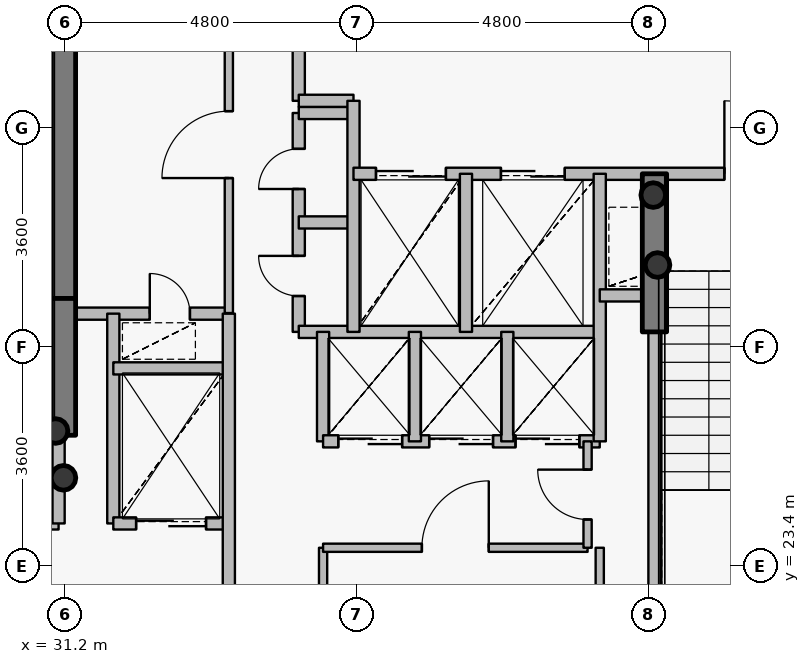
"""IFC4 building model, lengths in metres.
Left out: names, types, materials, properties, quantities, classifications, styles, units other than length and angle.
Written with IfcOpenShell. Run it as: python <this file> out.ifc"""

import sys

from ifc_helpers import new_model, si_unit, direction, frame, frame_2d, origin, origin_2d, place, context, subcontext, project, spatial, rectangle, hollow_circle, extrude, source, transform, mapped, element, fill, save


model = new_model("IFC4")
c1 = context("Model", 3, precision=1e-05, world=origin(), true_north=direction((0.0, 1.0)))
c2 = subcontext(c1, "Body", "Model", "MODEL_VIEW")
j1 = project(units=[si_unit("LENGTHUNIT", "METRE"), si_unit("PLANEANGLEUNIT", "RADIAN")], contexts=[c1])
p1 = place(None, origin())
s1 = spatial("IfcSite", under=j1, at=p1, CompositionType="ELEMENT")
p2 = place(p1, origin())
s2 = spatial("IfcBuilding", under=s1, at=p2, CompositionType="ELEMENT")
p3 = place(p2, frame((0.0, 0.0, 276.75)))
s3 = spatial("IfcBuildingStorey", under=s2, at=p3, CompositionType="ELEMENT", Elevation=276.75)
p4 = place(p3, frame((31.18, 27.8, 0.0), z_axis=(0.0, 0.0, 1.0), x_axis=(0.0, 1.0, 0.0)))
e1 = element("IfcWall", 1, at=p4, inside=s3, PredefinedType="SHEAR", context=c2, shape_type="SweptSolid", body=[
    extrude(rectangle(XDim=4.75, YDim=0.4, at=frame_2d((2.375, 0.0))), origin(), (0.0, 0.0, 1.0), 3.75),
])
for number, where, z_axis, x_axis in (
    (2, (31.05, 25.62, 0.0), (0.0, 0.0, 1.0), (1.0, 0.0, 0.0)),
    (3, (31.18, 24.85, 0.0), (0.0, 0.0, 1.0), (1.0, 0.0, 0.0)),
    (4, (40.95, 28.35, 0.0), (0.0, 0.0, 1.0), (1.0, 0.0, 0.0)),
    (5, (40.88, 29.5, 0.0), (0.0, 0.0, 1.0), (1.0, 0.0, 0.0)),
):
    element("IfcColumn", number, at=place(p3, frame(where, z_axis=z_axis, x_axis=x_axis)), inside=s3, PredefinedType="COLUMN", context=c2, shape_type="SweptSolid", body=[
        extrude(hollow_circle(Radius=0.203, WallThickness=0.016, at=origin_2d()), origin(), (0.0, 0.0, 1.0), 3.75),
    ])
p5 = place(p3, frame((31.18, 25.55, 0.0), z_axis=(0.0, 0.0, 1.0), x_axis=(0.0, 1.0, 0.0)))
e6 = element("IfcWall", 6, at=p5, inside=s3, PredefinedType="SHEAR", context=c2, shape_type="SweptSolid", body=[
    extrude(rectangle(XDim=2.25, YDim=0.4, at=frame_2d((1.125, 0.0))), origin(), (0.0, 0.0, 1.0), 3.1),
])
p6 = place(p3, frame((40.9, 27.25, 0.0), z_axis=(0.0, 0.0, 1.0), x_axis=(0.0, 1.0, 0.0)))
e7 = element("IfcWall", 7, at=p6, inside=s3, PredefinedType="SHEAR", context=c2, shape_type="SweptSolid", body=[
    extrude(rectangle(XDim=2.6, YDim=0.4, at=frame_2d((1.3, 0.0))), origin(), (0.0, 0.0, 1.0), 3.1),
])
p7 = place(p3, frame((27.56, 24.1, 0.0), z_axis=(0.0, 0.0, 1.0), x_axis=(1.0, 0.0, 0.0)))
e8 = element("IfcWall", 8, at=p7, inside=s3, PredefinedType="PARTITIONING", context=c2, shape_type="SweptSolid", body=[
    extrude(rectangle(XDim=3.54, YDim=0.2, at=frame_2d((1.77, 0.0))), origin(), (0.0, 0.0, 1.0), 3.5),
])
p8 = place(p7, frame((1.17, 0.0, 0.0)))
e9 = element("IfcOpeningElement", 9, at=p8, cuts=e8, PredefinedType="OPENING", context=c2, shape_type="SweptSolid", body=[
    extrude(rectangle(XDim=1.2, YDim=2.15, at=origin_2d()), frame((0.6, 0.11, 1.075), z_axis=(0.0, -1.0, 0.0), x_axis=(1.0, 0.0, 0.0)), (0.0, 0.0, 1.0), 0.22),
])
p9 = place(p3, frame((31.1, 24.1, 0.0), z_axis=(0.0, 0.0, 1.0), x_axis=(0.0, 1.0, 0.0)))
e10 = element("IfcWall", 10, at=p9, inside=s3, PredefinedType="PARTITIONING", context=c2, shape_type="SweptSolid", body=[
    extrude(rectangle(XDim=1.44, YDim=0.2, at=frame_2d((0.72, 0.0))), origin(), (0.0, 0.0, 1.0), 3.5),
])
p10 = place(p3, frame((31.1, 27.55, 0.0), z_axis=(0.0, 0.0, 1.0), x_axis=(1.0, 0.0, 0.0)))
e11 = element("IfcWall", 11, at=p10, inside=s3, PredefinedType="PARTITIONING", context=c2, shape_type="SweptSolid", body=[
    extrude(rectangle(XDim=2.8, YDim=0.2, at=frame_2d((1.4, 0.0))), origin(), (0.0, 0.0, 1.0), 3.085),
])
p11 = place(p10, frame((1.5, 0.0, 0.0)))
e12 = element("IfcOpeningElement", 12, at=p11, cuts=e11, PredefinedType="OPENING", context=c2, shape_type="SweptSolid", body=[
    extrude(rectangle(XDim=0.66, YDim=2.05, at=origin_2d()), frame((0.33, 0.11, 1.025), z_axis=(0.0, -1.0, 0.0), x_axis=(1.0, 0.0, 0.0)), (0.0, 0.0, 1.0), 0.22),
])
p12 = place(p3, frame((32.0, 24.1, 0.0), z_axis=(0.0, 0.0, 1.0), x_axis=(0.0, 1.0, 0.0)))
e13 = element("IfcWall", 13, at=p12, inside=s3, PredefinedType="PARTITIONING", context=c2, shape_type="SweptSolid", body=[
    extrude(rectangle(XDim=3.45, YDim=0.2, at=frame_2d((1.725, 0.0))), origin(), (0.0, 0.0, 1.0), 3.5),
])
p13 = place(p3, frame((32.0, 24.1, 0.0), z_axis=(0.0, 0.0, 1.0), x_axis=(1.0, 0.0, 0.0)))
e14 = element("IfcWall", 14, at=p13, inside=s3, PredefinedType="PARTITIONING", context=c2, shape_type="SweptSolid", body=[
    extrude(rectangle(XDim=1.9, YDim=0.2, at=frame_2d((0.95, 0.0))), origin(), (0.0, 0.0, 1.0), 3.085),
])
p14 = place(p13, frame((0.375, 0.0, 0.0)))
e15 = element("IfcOpeningElement", 15, at=p14, cuts=e14, PredefinedType="OPENING", context=c2, shape_type="SweptSolid", body=[
    extrude(rectangle(XDim=1.15, YDim=2.15, at=origin_2d()), frame((0.575, 0.11, 1.075), z_axis=(0.0, -1.0, 0.0), x_axis=(1.0, 0.0, 0.0)), (0.0, 0.0, 1.0), 0.22),
])
p15 = place(p3, frame((32.0, 26.65, 0.0), z_axis=(0.0, 0.0, 1.0), x_axis=(1.0, 0.0, 0.0)))
e16 = element("IfcWall", 16, at=p15, inside=s3, PredefinedType="PARTITIONING", context=c2, shape_type="SweptSolid", body=[
    extrude(rectangle(XDim=1.9, YDim=0.2, at=frame_2d((0.95, 0.0))), origin(), (0.0, 0.0, 1.0), 3.085),
])
p16 = place(p3, frame((33.9, 20.9, 0.0), z_axis=(0.0, 0.0, 1.0), x_axis=(0.0, 1.0, 0.0)))
e17 = element("IfcWall", 17, at=p16, inside=s3, PredefinedType="PARTITIONING", context=c2, shape_type="SweptSolid", body=[
    extrude(rectangle(XDim=6.65, YDim=0.2, at=frame_2d((3.325, 0.0))), origin(), (0.0, 0.0, 1.0), 3.085),
])
p17 = place(p3, frame((33.9, 27.56, 0.0), z_axis=(0.0, 0.0, 1.0), x_axis=(0.0, 1.0, 0.0)))
e18 = element("IfcWall", 18, at=p17, inside=s3, PredefinedType="PARTITIONING", context=c2, shape_type="SweptSolid", body=[
    extrude(rectangle(XDim=5.54, YDim=0.135, at=frame_2d((2.77, 0.0))), origin(), (0.0, 0.0, 1.0), 3.085),
])
p18 = place(p17, frame((2.22, 0.0, 0.0)))
e19 = element("IfcOpeningElement", 19, at=p18, cuts=e18, PredefinedType="OPENING", context=c2, shape_type="SweptSolid", body=[
    extrude(rectangle(XDim=1.1, YDim=2.15, at=origin_2d()), frame((0.55, 0.078, 1.075), z_axis=(0.0, -1.0, 0.0), x_axis=(1.0, 0.0, 0.0)), (0.0, 0.0, 1.0), 0.155),
])
p19 = place(p3, frame((35.05, 27.25, 0.0), z_axis=(0.0, 0.0, 1.0), x_axis=(0.0, 1.0, 0.0)))
e20 = element("IfcWall", 20, at=p19, inside=s3, PredefinedType="PARTITIONING", context=c2, shape_type="SweptSolid", body=[
    extrude(rectangle(XDim=3.6, YDim=0.2, at=frame_2d((1.8, 0.0))), origin(), (0.0, 0.0, 1.0), 3.5),
])
p20 = place(p19, frame((0.59, 0.0, 0.0)))
e21 = element("IfcOpeningElement", 21, at=p20, cuts=e20, PredefinedType="OPENING", context=c2, shape_type="SweptSolid", body=[
    extrude(rectangle(XDim=0.66, YDim=2.05, at=origin_2d()), frame((0.33, 0.11, 1.025), z_axis=(0.0, -1.0, 0.0), x_axis=(1.0, 0.0, 0.0)), (0.0, 0.0, 1.0), 0.22),
])
p21 = place(p19, frame((2.35, 0.0, 0.0)))
e22 = element("IfcOpeningElement", 22, at=p21, cuts=e20, PredefinedType="OPENING", context=c2, shape_type="SweptSolid", body=[
    extrude(rectangle(XDim=0.66, YDim=2.05, at=origin_2d()), frame((0.33, 0.11, 1.025), z_axis=(0.0, -1.0, 0.0), x_axis=(1.0, 0.0, 0.0)), (0.0, 0.0, 1.0), 0.22),
])
p22 = place(p3, frame((35.05, 27.25, 0.0), z_axis=(0.0, 0.0, 1.0), x_axis=(1.0, 0.0, 0.0)))
e23 = element("IfcWall", 23, at=p22, inside=s3, PredefinedType="PARTITIONING", context=c2, shape_type="SweptSolid", body=[
    extrude(rectangle(XDim=4.95, YDim=0.2, at=frame_2d((2.475, 0.0))), origin(), (0.0, 0.0, 1.0), 3.085),
])
for number, where, z_axis, x_axis in (
    (24, (35.05, 29.05, 0.0), (0.0, 0.0, 1.0), (1.0, 0.0, 0.0)),
    (25, (35.05, 30.85, 0.0), (0.0, 0.0, 1.0), (1.0, 0.0, 0.0)),
):
    element("IfcWall", number, at=place(p3, frame(where, z_axis=z_axis, x_axis=x_axis)), inside=s3, PredefinedType="PARTITIONING", context=c2, shape_type="SweptSolid", body=[
        extrude(rectangle(XDim=0.9, YDim=0.2, at=frame_2d((0.45, 0.0))), origin(), (0.0, 0.0, 1.0), 3.5),
    ])
p23 = place(p3, frame((35.05, 31.05, 0.0), z_axis=(0.0, 0.0, 1.0), x_axis=(0.0, 1.0, 0.0)))
e26 = element("IfcWall", 26, at=p23, inside=s3, PredefinedType="PARTITIONING", context=c2, shape_type="SweptSolid", body=[
    extrude(rectangle(XDim=2.05, YDim=0.2, at=frame_2d((1.025, 0.0))), origin(), (0.0, 0.0, 1.0), 3.085),
])
p24 = place(p3, frame((35.05, 31.05, 0.0), z_axis=(0.0, 0.0, 1.0), x_axis=(1.0, 0.0, 0.0)))
e27 = element("IfcWall", 27, at=p24, inside=s3, PredefinedType="PARTITIONING", context=c2, shape_type="SweptSolid", body=[
    extrude(rectangle(XDim=0.9, YDim=0.2, at=frame_2d((0.45, 0.0))), origin(), (0.0, 0.0, 1.0), 3.5),
])
p25 = place(p3, frame((35.45, 20.9, 0.0), z_axis=(0.0, 0.0, 1.0), x_axis=(0.0, 1.0, 0.0)))
e28 = element("IfcWall", 28, at=p25, inside=s3, PredefinedType="PARTITIONING", context=c2, shape_type="SweptSolid", body=[
    extrude(rectangle(XDim=2.8, YDim=0.135, at=frame_2d((1.4, 0.0))), origin(), (0.0, 0.0, 1.0), 3.085),
])
p26 = place(p3, frame((35.45, 23.7, 0.0), z_axis=(0.0, 0.0, 1.0), x_axis=(1.0, 0.0, 0.0)))
e29 = element("IfcWall", 29, at=p26, inside=s3, PredefinedType="PARTITIONING", context=c2, shape_type="SweptSolid", body=[
    extrude(rectangle(XDim=4.35, YDim=0.135, at=frame_2d((2.175, 0.0))), origin(), (0.0, 0.0, 1.0), 3.085),
])
p27 = place(p26, frame((1.625, 0.0, 0.0)))
e30 = element("IfcOpeningElement", 30, at=p27, cuts=e29, PredefinedType="OPENING", context=c2, shape_type="SweptSolid", body=[
    extrude(rectangle(XDim=1.1, YDim=2.15, at=origin_2d()), frame((0.55, 0.078, 1.075), z_axis=(0.0, -1.0, 0.0), x_axis=(1.0, 0.0, 0.0)), (0.0, 0.0, 1.0), 0.155),
])
p28 = place(p3, frame((35.45, 25.45, 0.0), z_axis=(0.0, 0.0, 1.0), x_axis=(0.0, 1.0, 0.0)))
e31 = element("IfcWall", 31, at=p28, inside=s3, PredefinedType="PARTITIONING", context=c2, shape_type="SweptSolid", body=[
    extrude(rectangle(XDim=1.8, YDim=0.2, at=frame_2d((0.9, 0.0))), origin(), (0.0, 0.0, 1.0), 3.5),
])
p29 = place(p3, frame((35.45, 25.45, 0.0), z_axis=(0.0, 0.0, 1.0), x_axis=(1.0, 0.0, 0.0)))
e32 = element("IfcWall", 32, at=p29, inside=s3, PredefinedType="PARTITIONING", context=c2, shape_type="SweptSolid", body=[
    extrude(rectangle(XDim=4.55, YDim=0.2, at=frame_2d((2.275, 0.0))), origin(), (0.0, 0.0, 1.0), 3.085),
])
p30 = place(p29, frame((0.25, 0.0, 0.0)))
e33 = element("IfcOpeningElement", 33, at=p30, cuts=e32, PredefinedType="OPENING", context=c2, shape_type="SweptSolid", body=[
    extrude(rectangle(XDim=1.05, YDim=2.15, at=origin_2d()), frame((0.525, 0.11, 1.075), z_axis=(0.0, -1.0, 0.0), x_axis=(1.0, 0.0, 0.0)), (0.0, 0.0, 1.0), 0.22),
])
p31 = place(p29, frame((1.745, 0.0, 0.0)))
e34 = element("IfcOpeningElement", 34, at=p31, cuts=e32, PredefinedType="OPENING", context=c2, shape_type="SweptSolid", body=[
    extrude(rectangle(XDim=1.05, YDim=2.15, at=origin_2d()), frame((0.525, 0.11, 1.075), z_axis=(0.0, -1.0, 0.0), x_axis=(1.0, 0.0, 0.0)), (0.0, 0.0, 1.0), 0.22),
])
p32 = place(p29, frame((3.165, 0.0, 0.0)))
e35 = element("IfcOpeningElement", 35, at=p32, cuts=e32, PredefinedType="OPENING", context=c2, shape_type="SweptSolid", body=[
    extrude(rectangle(XDim=1.05, YDim=2.15, at=origin_2d()), frame((0.525, 0.11, 1.075), z_axis=(0.0, -1.0, 0.0), x_axis=(1.0, 0.0, 0.0)), (0.0, 0.0, 1.0), 0.22),
])
p33 = place(p3, frame((35.95, 27.25, 0.0), z_axis=(0.0, 0.0, 1.0), x_axis=(0.0, 1.0, 0.0)))
e36 = element("IfcWall", 36, at=p33, inside=s3, PredefinedType="PARTITIONING", context=c2, shape_type="SweptSolid", body=[
    extrude(rectangle(XDim=3.8, YDim=0.2, at=frame_2d((1.9, 0.0))), origin(), (0.0, 0.0, 1.0), 3.5),
])
p34 = place(p3, frame((35.95, 29.85, 0.0), z_axis=(0.0, 0.0, 1.0), x_axis=(1.0, 0.0, 0.0)))
e37 = element("IfcWall", 37, at=p34, inside=s3, PredefinedType="PARTITIONING", context=c2, shape_type="SweptSolid", body=[
    extrude(rectangle(XDim=8.49, YDim=0.2, at=frame_2d((4.245, 0.0))), origin(), (0.0, 0.0, 1.0), 3.085),
])
p35 = place(p34, frame((6.1, 0.0, 0.0)))
e38 = element("IfcOpeningElement", 38, at=p35, cuts=e37, PredefinedType="OPENING", context=c2, shape_type="SweptSolid", body=[
    extrude(rectangle(XDim=1.2, YDim=2.15, at=origin_2d()), frame((0.6, 0.11, 1.075), z_axis=(0.0, -1.0, 0.0), x_axis=(1.0, 0.0, 0.0)), (0.0, 0.0, 1.0), 0.22),
])
p36 = place(p34, frame((0.37, 0.0, 0.0)))
e39 = element("IfcOpeningElement", 39, at=p36, cuts=e37, PredefinedType="OPENING", context=c2, shape_type="SweptSolid", body=[
    extrude(rectangle(XDim=1.15, YDim=2.15, at=origin_2d()), frame((0.575, 0.11, 1.075), z_axis=(0.0, -1.0, 0.0), x_axis=(1.0, 0.0, 0.0)), (0.0, 0.0, 1.0), 0.22),
])
p37 = place(p34, frame((2.425, 0.0, 0.0)))
e40 = element("IfcOpeningElement", 40, at=p37, cuts=e37, PredefinedType="OPENING", context=c2, shape_type="SweptSolid", body=[
    extrude(rectangle(XDim=1.05, YDim=2.15, at=origin_2d()), frame((0.525, 0.11, 1.075), z_axis=(0.0, -1.0, 0.0), x_axis=(1.0, 0.0, 0.0)), (0.0, 0.0, 1.0), 0.22),
])
p38 = place(p3, frame((36.96, 25.45, 0.0), z_axis=(0.0, 0.0, 1.0), x_axis=(0.0, 1.0, 0.0)))
e41 = element("IfcWall", 41, at=p38, inside=s3, PredefinedType="PARTITIONING", context=c2, shape_type="SweptSolid", body=[
    extrude(rectangle(XDim=1.8, YDim=0.2, at=frame_2d((0.9, 0.0))), origin(), (0.0, 0.0, 1.0), 3.5),
])
p39 = place(p3, frame((37.8, 27.25, 0.0), z_axis=(0.0, 0.0, 1.0), x_axis=(0.0, 1.0, 0.0)))
e42 = element("IfcWall", 42, at=p39, inside=s3, PredefinedType="PARTITIONING", context=c2, shape_type="SweptSolid", body=[
    extrude(rectangle(XDim=2.6, YDim=0.2, at=frame_2d((1.3, 0.0))), origin(), (0.0, 0.0, 1.0), 3.5),
])
p40 = place(p3, frame((38.48, 25.45, 0.0), z_axis=(0.0, 0.0, 1.0), x_axis=(0.0, 1.0, 0.0)))
e43 = element("IfcWall", 43, at=p40, inside=s3, PredefinedType="PARTITIONING", context=c2, shape_type="SweptSolid", body=[
    extrude(rectangle(XDim=1.8, YDim=0.2, at=frame_2d((0.9, 0.0))), origin(), (0.0, 0.0, 1.0), 3.5),
])
p41 = place(p3, frame((39.8, 23.7, 0.0), z_axis=(0.0, 0.0, 1.0), x_axis=(0.0, 1.0, 0.0)))
e44 = element("IfcWall", 44, at=p41, inside=s3, PredefinedType="PARTITIONING", context=c2, shape_type="SweptSolid", body=[
    extrude(rectangle(XDim=1.75, YDim=0.135, at=frame_2d((0.875, 0.0))), origin(), (0.0, 0.0, 1.0), 3.5),
])
p42 = place(p41, frame((0.465, 0.0, 0.0)))
e45 = element("IfcOpeningElement", 45, at=p42, cuts=e44, PredefinedType="OPENING", context=c2, shape_type="SweptSolid", body=[
    extrude(rectangle(XDim=0.82, YDim=2.1, at=origin_2d()), frame((0.41, 0.078, 1.05), z_axis=(0.0, -1.0, 0.0), x_axis=(1.0, 0.0, 0.0)), (0.0, 0.0, 1.0), 0.155),
])
p43 = place(p3, frame((40.0, 25.45, 0.0), z_axis=(0.0, 0.0, 1.0), x_axis=(0.0, 1.0, 0.0)))
e46 = element("IfcWall", 46, at=p43, inside=s3, PredefinedType="PARTITIONING", context=c2, shape_type="SweptSolid", body=[
    extrude(rectangle(XDim=4.4, YDim=0.2, at=frame_2d((2.2, 0.0))), origin(), (0.0, 0.0, 1.0), 3.5),
])
p44 = place(p3, frame((40.0, 27.85, 0.0), z_axis=(0.0, 0.0, 1.0), x_axis=(1.0, 0.0, 0.0)))
e47 = element("IfcWall", 47, at=p44, inside=s3, PredefinedType="PARTITIONING", context=c2, shape_type="SweptSolid", body=[
    extrude(rectangle(XDim=0.9, YDim=0.2, at=frame_2d((0.45, 0.0))), origin(), (0.0, 0.0, 1.0), 3.5),
])
p45 = place(p3, frame((40.9, 21.33, 0.0), z_axis=(0.0, 0.0, 1.0), x_axis=(0.0, 1.0, 0.0)))
e48 = element("IfcWall", 48, at=p45, inside=s3, PredefinedType="PARTITIONING", context=c2, shape_type="SweptSolid", body=[
    extrude(rectangle(XDim=5.91, YDim=0.2, at=frame_2d((2.955, 0.0))), origin(), (0.0, 0.0, 1.0), 3.035),
])
p46 = place(p3, frame((40.0, 23.7, 0.0), z_axis=(0.0, 0.0, 1.0), x_axis=(0.0, -1.0, 0.0)))
e49 = element("IfcWall", 49, at=p46, inside=s3, PredefinedType="PARTITIONING", context=c2, shape_type="SweptSolid", body=[
    extrude(rectangle(XDim=2.54, YDim=0.135, at=frame_2d((1.27, 0.0))), origin(), (0.0, 0.0, 1.0), 3.035),
])
m1 = source(origin(), c2, "Body", "SweptSolid", [
    extrude(rectangle(XDim=1.2, YDim=2.15, at=origin_2d()), frame((0.6, 0.025, 1.075), z_axis=(0.0, -1.0, 0.0), x_axis=(1.0, 0.0, 0.0)), (0.0, 0.0, 1.0), 0.05),
])
p47 = place(p35, origin())
e50 = element("IfcDoor", 50, at=p47, inside=s3, OperationType="SINGLE_SWING_LEFT", PredefinedType="DOOR", context=c2, shape_type="MappedRepresentation", body=[
    mapped(m1, transform((0.0, 0.0, 0.0), x_axis=(1.0, 0.0, 0.0), y_axis=(0.0, 1.0, 0.0), z_axis=(0.0, 0.0, 1.0), scale=1.0)),
])
fill(e38, e50)
m2 = source(origin(), c2, "Body", "SweptSolid", [
    extrude(rectangle(XDim=1.15, YDim=2.15, at=origin_2d()), frame((0.575, 0.025, 1.075), z_axis=(0.0, -1.0, 0.0), x_axis=(1.0, 0.0, 0.0)), (0.0, 0.0, 1.0), 0.05),
])
p48 = place(p36, origin())
e51 = element("IfcDoor", 51, at=p48, inside=s3, OperationType="DOUBLE_DOOR_SLIDING", PredefinedType="USERDEFINED", context=c2, shape_type="MappedRepresentation", body=[
    mapped(m2, transform((0.0, 0.0, 0.0), x_axis=(1.0, 0.0, 0.0), y_axis=(0.0, 1.0, 0.0), z_axis=(0.0, 0.0, 1.0), scale=1.0)),
])
fill(e39, e51)
p49 = place(p14, origin())
e52 = element("IfcDoor", 52, at=p49, inside=s3, OperationType="DOUBLE_DOOR_SLIDING", PredefinedType="USERDEFINED", context=c2, shape_type="MappedRepresentation", body=[
    mapped(m2, transform((0.0, 0.0, 0.0), x_axis=(1.0, 0.0, 0.0), y_axis=(0.0, 1.0, 0.0), z_axis=(0.0, 0.0, 1.0), scale=1.0)),
])
fill(e15, e52)
m3 = source(origin(), c2, "Body", "SweptSolid", [
    extrude(rectangle(XDim=1.05, YDim=2.15, at=origin_2d()), frame((0.525, 0.025, 1.075), z_axis=(0.0, -1.0, 0.0), x_axis=(1.0, 0.0, 0.0)), (0.0, 0.0, 1.0), 0.05),
])
p50 = place(p37, origin())
e53 = element("IfcDoor", 53, at=p50, inside=s3, OperationType="DOUBLE_DOOR_SLIDING", PredefinedType="USERDEFINED", context=c2, shape_type="MappedRepresentation", body=[
    mapped(m3, transform((0.0, 0.0, 0.0), x_axis=(1.0, 0.0, 0.0), y_axis=(0.0, 1.0, 0.0), z_axis=(0.0, 0.0, 1.0), scale=1.0)),
])
fill(e40, e53)
p51 = place(p30, origin())
e54 = element("IfcDoor", 54, at=p51, inside=s3, OperationType="DOUBLE_DOOR_SLIDING", PredefinedType="USERDEFINED", context=c2, shape_type="MappedRepresentation", body=[
    mapped(m3, transform((0.0, 0.0, 0.0), x_axis=(1.0, 0.0, 0.0), y_axis=(0.0, 1.0, 0.0), z_axis=(0.0, 0.0, 1.0), scale=1.0)),
])
fill(e33, e54)
p52 = place(p31, origin())
e55 = element("IfcDoor", 55, at=p52, inside=s3, OperationType="DOUBLE_DOOR_SLIDING", PredefinedType="USERDEFINED", context=c2, shape_type="MappedRepresentation", body=[
    mapped(m3, transform((0.0, 0.0, 0.0), x_axis=(1.0, 0.0, 0.0), y_axis=(0.0, 1.0, 0.0), z_axis=(0.0, 0.0, 1.0), scale=1.0)),
])
fill(e34, e55)
p53 = place(p32, origin())
e56 = element("IfcDoor", 56, at=p53, inside=s3, OperationType="DOUBLE_DOOR_SLIDING", PredefinedType="USERDEFINED", context=c2, shape_type="MappedRepresentation", body=[
    mapped(m3, transform((0.0, 0.0, 0.0), x_axis=(1.0, 0.0, 0.0), y_axis=(0.0, 1.0, 0.0), z_axis=(0.0, 0.0, 1.0), scale=1.0)),
])
fill(e35, e56)
m4 = source(origin(), c2, "Body", "SweptSolid", [
    extrude(rectangle(XDim=0.66, YDim=2.05, at=origin_2d()), frame((0.33, 0.025, 1.025), z_axis=(0.0, -1.0, 0.0), x_axis=(1.0, 0.0, 0.0)), (0.0, 0.0, 1.0), 0.05),
])
p54 = place(p20, origin())
e57 = element("IfcDoor", 57, at=p54, inside=s3, OperationType="SINGLE_SWING_RIGHT", PredefinedType="USERDEFINED", context=c2, shape_type="MappedRepresentation", body=[
    mapped(m4, transform((0.0, 0.0, 0.0), x_axis=(1.0, 0.0, 0.0), y_axis=(0.0, 1.0, 0.0), z_axis=(0.0, 0.0, 1.0), scale=1.0)),
])
fill(e21, e57)
p55 = place(p21, origin())
e58 = element("IfcDoor", 58, at=p55, inside=s3, OperationType="SINGLE_SWING_LEFT", PredefinedType="USERDEFINED", context=c2, shape_type="MappedRepresentation", body=[
    mapped(m4, transform((0.0, 0.0, 0.0), x_axis=(1.0, 0.0, 0.0), y_axis=(0.0, 1.0, 0.0), z_axis=(0.0, 0.0, 1.0), scale=1.0)),
])
fill(e22, e58)
m5 = source(origin(), c2, "Body", "SweptSolid", [
    extrude(rectangle(XDim=1.1, YDim=2.15, at=origin_2d()), frame((0.55, 0.025, 1.075), z_axis=(0.0, -1.0, 0.0), x_axis=(1.0, 0.0, 0.0)), (0.0, 0.0, 1.0), 0.05),
])
p56 = place(p27, origin())
e59 = element("IfcDoor", 59, at=p56, inside=s3, OperationType="SINGLE_SWING_RIGHT", PredefinedType="DOOR", context=c2, shape_type="MappedRepresentation", body=[
    mapped(m5, transform((0.0, 0.0, 0.0), x_axis=(1.0, 0.0, 0.0), y_axis=(0.0, 1.0, 0.0), z_axis=(0.0, 0.0, 1.0), scale=1.0)),
])
fill(e30, e59)
p57 = place(p18, origin())
e60 = element("IfcDoor", 60, at=p57, inside=s3, OperationType="SINGLE_SWING_LEFT", PredefinedType="DOOR", context=c2, shape_type="MappedRepresentation", body=[
    mapped(m5, transform((0.0, 0.0, 0.0), x_axis=(1.0, 0.0, 0.0), y_axis=(0.0, 1.0, 0.0), z_axis=(0.0, 0.0, 1.0), scale=1.0)),
])
fill(e19, e60)
m6 = source(origin(), c2, "Body", "SweptSolid", [
    extrude(rectangle(XDim=0.82, YDim=2.1, at=origin_2d()), frame((0.41, 0.025, 1.05), z_axis=(0.0, -1.0, 0.0), x_axis=(1.0, 0.0, 0.0)), (0.0, 0.0, 1.0), 0.05),
])
p58 = place(p42, origin())
e61 = element("IfcDoor", 61, at=p58, inside=s3, OperationType="SINGLE_SWING_RIGHT", PredefinedType="DOOR", context=c2, shape_type="MappedRepresentation", body=[
    mapped(m6, transform((0.0, 0.0, 0.0), x_axis=(1.0, 0.0, 0.0), y_axis=(0.0, 1.0, 0.0), z_axis=(0.0, 0.0, 1.0), scale=1.0)),
])
fill(e45, e61)
p59 = place(p11, origin())
e62 = element("IfcDoor", 62, at=p59, inside=s3, OperationType="SINGLE_SWING_LEFT", PredefinedType="USERDEFINED", context=c2, shape_type="MappedRepresentation", body=[
    mapped(m4, transform((0.0, 0.0, 0.0), x_axis=(1.0, 0.0, 0.0), y_axis=(0.0, 1.0, 0.0), z_axis=(0.0, 0.0, 1.0), scale=1.0)),
])
fill(e12, e62)
save(model, sys.argv[1])
